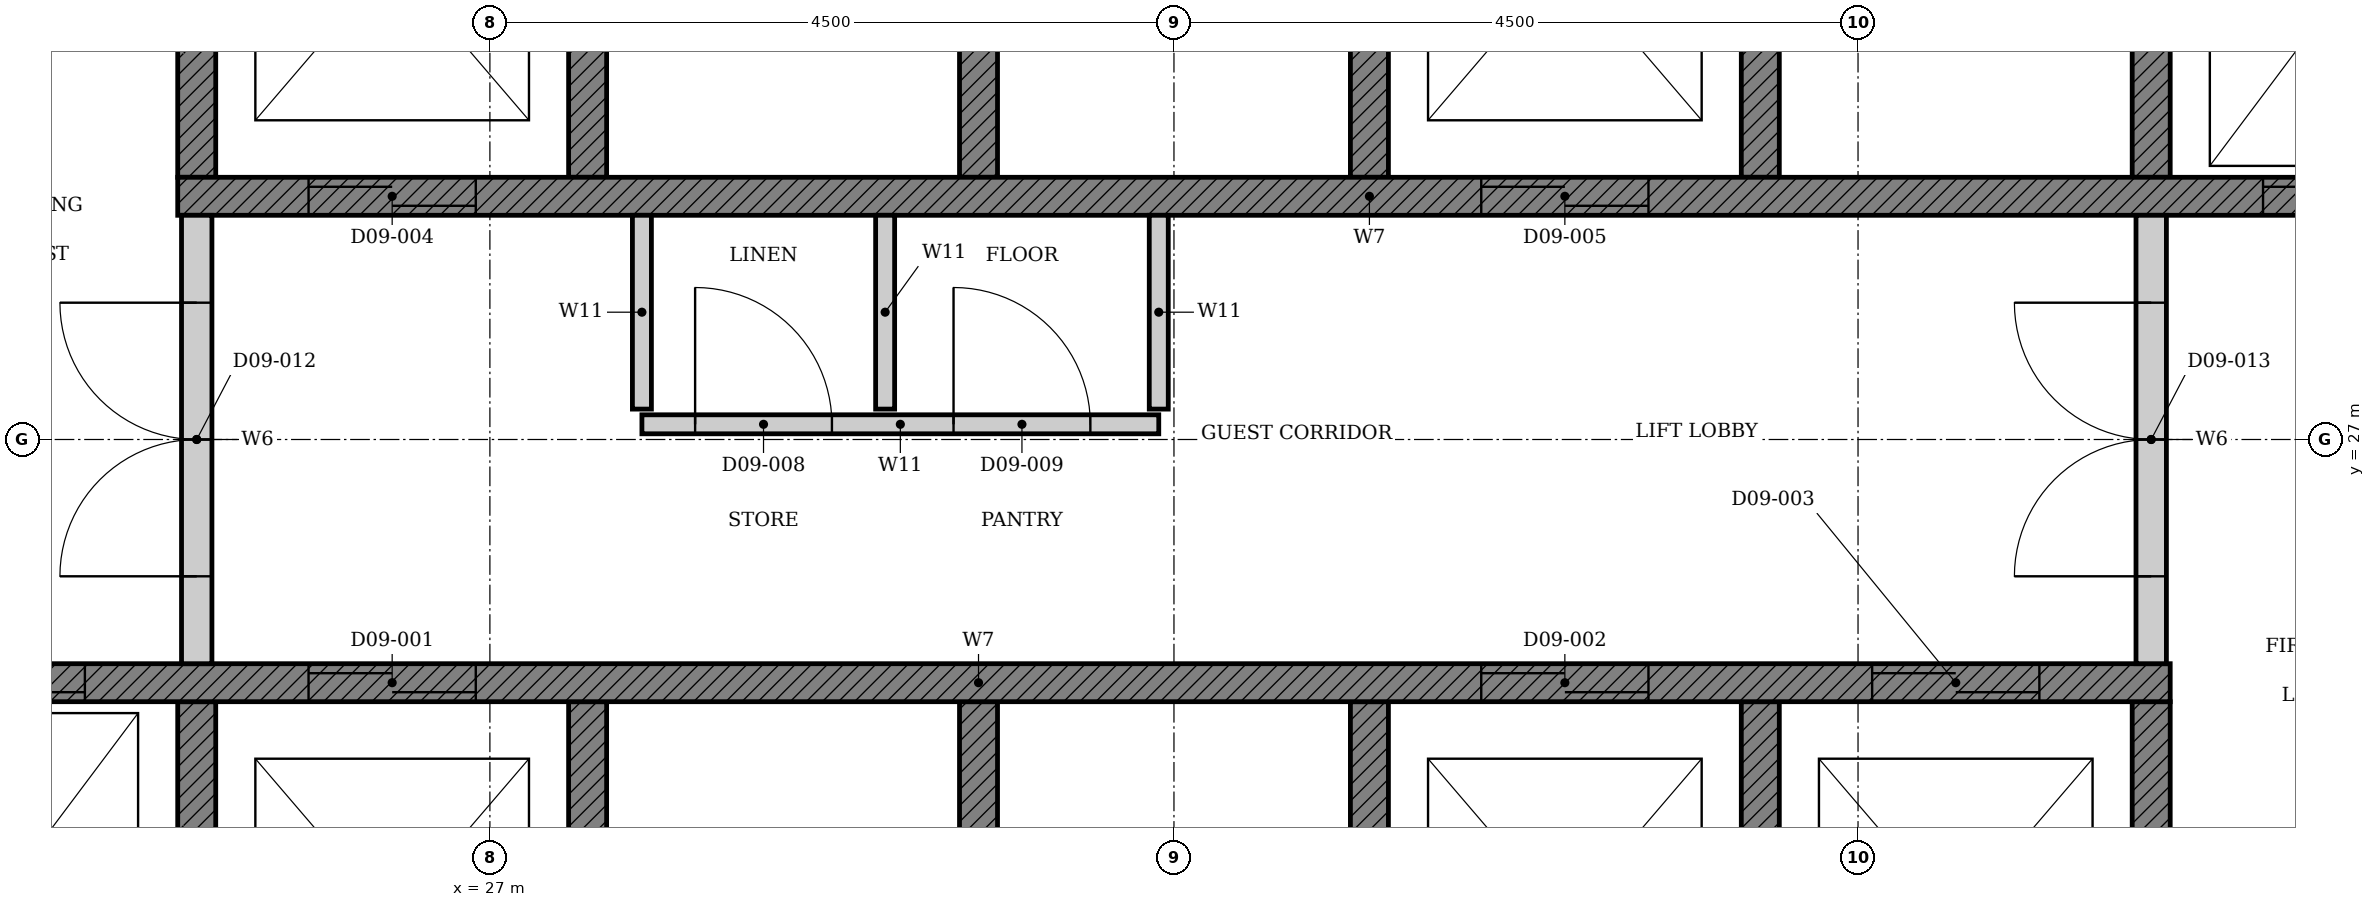
"""IFC4 building model, lengths in metres.
Left out: names, types, materials, properties, quantities, classifications, styles, units other than length and angle.
Written with IfcOpenShell. Run it as: python <this file> out.ifc"""

import sys

from ifc_helpers import new_model, si_unit, direction, frame, frame_2d, origin, place, context, subcontext, project, spatial, polyline, rectangle, outline, extrude, element, fill, save


model = new_model("IFC4")
c1 = context("Model", 3, precision=1e-05, world=origin(), true_north=direction((0.0, 1.0)))
c2 = subcontext(c1, "Body", "Model", "MODEL_VIEW")
j1 = project(units=[si_unit("LENGTHUNIT", "METRE"), si_unit("PLANEANGLEUNIT", "RADIAN")], contexts=[c1])
p1 = place(None, origin())
s1 = spatial("IfcSite", under=j1, at=p1, CompositionType="ELEMENT")
p2 = place(p1, origin())
s2 = spatial("IfcBuilding", under=s1, at=p2, CompositionType="ELEMENT")
p3 = place(p2, frame((0.0, 0.0, 44.4)))
s3 = spatial("IfcBuildingStorey", under=s2, at=p3, CompositionType="ELEMENT", Elevation=44.4)
p4 = place(p3, origin())
e1 = element("IfcWall", 1, at=p4, inside=s3, PredefinedType="SHEAR", context=c2, shape_type="SweptSolid", body=[
    extrude(outline(polyline([(22.375, 22.35), (38.053, 22.35), (38.053, 25.275), (37.803, 25.275), (37.803, 22.65), (35.482, 22.65), (35.482, 25.275), (35.232, 25.275), (35.232, 22.65), (32.911, 22.65), (32.911, 25.275), (32.661, 25.275), (32.661, 22.65), (30.339, 22.65), (30.339, 25.275), (30.089, 25.275), (30.089, 22.65), (27.768, 22.65), (27.768, 25.275), (27.518, 25.275), (27.518, 22.65), (25.197, 22.65), (25.197, 25.275), (24.947, 25.275), (24.947, 22.65), (22.625, 22.65), (22.625, 25.275), (22.375, 25.275), (22.375, 22.35)])), origin(), (0.0, 0.0, 1.0), 3.2),
])
p5 = place(p3, origin())
e2 = element("IfcWall", 2, at=p5, inside=s3, PredefinedType="SHEAR", context=c2, shape_type="SweptSolid", body=[
    extrude(outline(polyline([(24.947, 28.725), (25.197, 28.725), (25.197, 31.35), (27.518, 31.35), (27.518, 28.725), (27.768, 28.725), (27.768, 31.35), (30.089, 31.35), (30.089, 28.725), (30.339, 28.725), (30.339, 31.35), (32.661, 31.35), (32.661, 28.725), (32.911, 28.725), (32.911, 31.35), (35.232, 31.35), (35.232, 28.725), (35.482, 28.725), (35.482, 31.35), (37.803, 31.35), (37.803, 28.725), (38.053, 28.725), (38.053, 31.35), (40.375, 31.35), (40.375, 28.725), (40.625, 28.725), (40.625, 31.65), (24.947, 31.65), (24.947, 28.725)])), origin(), (0.0, 0.0, 1.0), 3.2),
])
p6 = place(p3, frame((22.375, 25.4, 0.0), z_axis=(0.0, 0.0, 1.0), x_axis=(1.0, 0.0, 0.0)))
e3 = element("IfcWall", 3, at=p6, inside=s3, PredefinedType="SHEAR", context=c2, shape_type="SweptSolid", body=[
    extrude(rectangle(XDim=15.678, YDim=0.25, at=frame_2d((7.839, 0.0))), origin(), (0.0, 0.0, 1.0), 3.2),
])
p7 = place(p6, frame((3.432, 0.0, 0.0)))
e4 = element("IfcOpeningElement", 4, at=p7, cuts=e3, PredefinedType="OPENING", context=c2, shape_type="SweptSolid", body=[
    extrude(rectangle(XDim=1.1, YDim=2.1, at=frame_2d((0.55, 1.05))), frame((0.0, 0.135, 0.0), z_axis=(0.0, -1.0, 0.0), x_axis=(1.0, 0.0, 0.0)), (0.0, 0.0, 1.0), 0.27),
])
p8 = place(p6, frame((11.146, 0.0, 0.0)))
e5 = element("IfcOpeningElement", 5, at=p8, cuts=e3, PredefinedType="OPENING", context=c2, shape_type="SweptSolid", body=[
    extrude(rectangle(XDim=1.1, YDim=2.1, at=frame_2d((0.55, 1.05))), frame((0.0, 0.135, 0.0), z_axis=(0.0, -1.0, 0.0), x_axis=(1.0, 0.0, 0.0)), (0.0, 0.0, 1.0), 0.27),
])
p9 = place(p6, frame((13.718, 0.0, 0.0)))
e6 = element("IfcOpeningElement", 6, at=p9, cuts=e3, PredefinedType="OPENING", context=c2, shape_type="SweptSolid", body=[
    extrude(rectangle(XDim=1.1, YDim=2.1, at=frame_2d((0.55, 1.05))), frame((0.0, 0.135, 0.0), z_axis=(0.0, -1.0, 0.0), x_axis=(1.0, 0.0, 0.0)), (0.0, 0.0, 1.0), 0.27),
])
p10 = place(p6, frame((0.861, 0.0, 0.0)))
e7 = element("IfcOpeningElement", 7, at=p10, cuts=e3, PredefinedType="OPENING", context=c2, shape_type="SweptSolid", body=[
    extrude(rectangle(XDim=1.1, YDim=2.1, at=frame_2d((0.55, 1.05))), frame((0.0, 0.135, 0.0), z_axis=(0.0, -1.0, 0.0), x_axis=(1.0, 0.0, 0.0)), (0.0, 0.0, 1.0), 0.27),
])
p11 = place(p3, frame((24.947, 28.6, 0.0), z_axis=(0.0, 0.0, 1.0), x_axis=(1.0, 0.0, 0.0)))
e8 = element("IfcWall", 8, at=p11, inside=s3, PredefinedType="SHEAR", context=c2, shape_type="SweptSolid", body=[
    extrude(rectangle(XDim=15.678, YDim=0.25, at=frame_2d((7.839, 0.0))), origin(), (0.0, 0.0, 1.0), 3.2),
])
p12 = place(p11, frame((0.861, 0.0, 0.0)))
e9 = element("IfcOpeningElement", 9, at=p12, cuts=e8, PredefinedType="OPENING", context=c2, shape_type="SweptSolid", body=[
    extrude(rectangle(XDim=1.1, YDim=2.1, at=frame_2d((0.55, 1.05))), frame((0.0, 0.135, 0.0), z_axis=(0.0, -1.0, 0.0), x_axis=(1.0, 0.0, 0.0)), (0.0, 0.0, 1.0), 0.27),
])
p13 = place(p11, frame((8.575, 0.0, 0.0)))
e10 = element("IfcOpeningElement", 10, at=p13, cuts=e8, PredefinedType="OPENING", context=c2, shape_type="SweptSolid", body=[
    extrude(rectangle(XDim=1.1, YDim=2.1, at=frame_2d((0.55, 1.05))), frame((0.0, 0.135, 0.0), z_axis=(0.0, -1.0, 0.0), x_axis=(1.0, 0.0, 0.0)), (0.0, 0.0, 1.0), 0.27),
])
p14 = place(p11, frame((13.718, 0.0, 0.0)))
e11 = element("IfcOpeningElement", 11, at=p14, cuts=e8, PredefinedType="OPENING", context=c2, shape_type="SweptSolid", body=[
    extrude(rectangle(XDim=1.1, YDim=2.1, at=frame_2d((0.55, 1.05))), frame((0.0, 0.135, 0.0), z_axis=(0.0, -1.0, 0.0), x_axis=(1.0, 0.0, 0.0)), (0.0, 0.0, 1.0), 0.27),
])
p15 = place(p3, frame((28.0, 27.1, 0.0), z_axis=(0.0, 0.0, 1.0), x_axis=(1.0, 0.0, 0.0)))
e12 = element("IfcWall", 12, at=p15, inside=s3, PredefinedType="PARTITIONING", context=c2, shape_type="SweptSolid", body=[
    extrude(rectangle(XDim=3.4, YDim=0.125, at=frame_2d((1.7, 0.0))), origin(), (0.0, 0.0, 1.0), 3.2),
])
p16 = place(p15, frame((0.35, 0.0, 0.0)))
e13 = element("IfcOpeningElement", 13, at=p16, cuts=e12, PredefinedType="OPENING", context=c2, shape_type="SweptSolid", body=[
    extrude(rectangle(XDim=0.9, YDim=2.1, at=frame_2d((0.45, 1.05))), frame((0.0, 0.073, 0.0), z_axis=(0.0, -1.0, 0.0), x_axis=(1.0, 0.0, 0.0)), (0.0, 0.0, 1.0), 0.145),
])
p17 = place(p15, frame((2.05, 0.0, 0.0)))
e14 = element("IfcOpeningElement", 14, at=p17, cuts=e12, PredefinedType="OPENING", context=c2, shape_type="SweptSolid", body=[
    extrude(rectangle(XDim=0.9, YDim=2.1, at=frame_2d((0.45, 1.05))), frame((0.0, 0.073, 0.0), z_axis=(0.0, -1.0, 0.0), x_axis=(1.0, 0.0, 0.0)), (0.0, 0.0, 1.0), 0.145),
])
for number, where, z_axis, x_axis in (
    (15, (28.0, 28.475, 0.0), (0.0, 0.0, 1.0), (0.0, -1.0, 0.0)),
    (16, (29.6, 28.475, 0.0), (0.0, 0.0, 1.0), (0.0, -1.0, 0.0)),
    (17, (31.4, 28.475, 0.0), (0.0, 0.0, 1.0), (0.0, -1.0, 0.0)),
):
    element("IfcWall", number, at=place(p3, frame(where, z_axis=z_axis, x_axis=x_axis)), inside=s3, PredefinedType="PARTITIONING", context=c2, shape_type="SweptSolid", body=[
        extrude(rectangle(XDim=1.275, YDim=0.125, at=frame_2d((0.638, 0.0))), origin(), (0.0, 0.0, 1.0), 3.2),
    ])
p18 = place(p3, frame((25.072, 25.525, 0.0), z_axis=(0.0, 0.0, 1.0), x_axis=(0.0, 1.0, 0.0)))
e18 = element("IfcWall", 18, at=p18, inside=s3, PredefinedType="PARTITIONING", context=c2, shape_type="SweptSolid", body=[
    extrude(rectangle(XDim=2.95, YDim=0.2, at=frame_2d((1.475, 0.0))), origin(), (0.0, 0.0, 1.0), 3.2),
])
p19 = place(p18, frame((0.575, 0.0, 0.0)))
e19 = element("IfcOpeningElement", 19, at=p19, cuts=e18, PredefinedType="OPENING", context=c2, shape_type="SweptSolid", body=[
    extrude(rectangle(XDim=1.8, YDim=2.1, at=frame_2d((0.9, 1.05))), frame((0.0, 0.11, 0.0), z_axis=(0.0, -1.0, 0.0), x_axis=(1.0, 0.0, 0.0)), (0.0, 0.0, 1.0), 0.22),
])
p20 = place(p3, frame((37.928, 25.525, 0.0), z_axis=(0.0, 0.0, 1.0), x_axis=(0.0, 1.0, 0.0)))
e20 = element("IfcWall", 20, at=p20, inside=s3, PredefinedType="PARTITIONING", context=c2, shape_type="SweptSolid", body=[
    extrude(rectangle(XDim=2.95, YDim=0.2, at=frame_2d((1.475, 0.0))), origin(), (0.0, 0.0, 1.0), 3.2),
])
p21 = place(p20, frame((0.575, 0.0, 0.0)))
e21 = element("IfcOpeningElement", 21, at=p21, cuts=e20, PredefinedType="OPENING", context=c2, shape_type="SweptSolid", body=[
    extrude(rectangle(XDim=1.8, YDim=2.1, at=frame_2d((0.9, 1.05))), frame((0.0, 0.11, 0.0), z_axis=(0.0, -1.0, 0.0), x_axis=(1.0, 0.0, 0.0)), (0.0, 0.0, 1.0), 0.22),
])
p22 = place(p7, origin())
e22 = element("IfcDoor", 22, at=p22, inside=s3, OperationType="DOUBLE_DOOR_SLIDING", PredefinedType="DOOR", context=c2, shape_type="SweptSolid", body=[
    extrude(rectangle(XDim=1.1, YDim=2.1, at=frame_2d((0.55, 1.05))), frame((0.0, 0.025, 0.0), z_axis=(0.0, -1.0, 0.0), x_axis=(1.0, 0.0, 0.0)), (0.0, 0.0, 1.0), 0.05),
])
fill(e4, e22)
p23 = place(p8, origin())
e23 = element("IfcDoor", 23, at=p23, inside=s3, OperationType="DOUBLE_DOOR_SLIDING", PredefinedType="DOOR", context=c2, shape_type="SweptSolid", body=[
    extrude(rectangle(XDim=1.1, YDim=2.1, at=frame_2d((0.55, 1.05))), frame((0.0, 0.025, 0.0), z_axis=(0.0, -1.0, 0.0), x_axis=(1.0, 0.0, 0.0)), (0.0, 0.0, 1.0), 0.05),
])
fill(e5, e23)
p24 = place(p9, origin())
e24 = element("IfcDoor", 24, at=p24, inside=s3, OperationType="DOUBLE_DOOR_SLIDING", PredefinedType="DOOR", context=c2, shape_type="SweptSolid", body=[
    extrude(rectangle(XDim=1.1, YDim=2.1, at=frame_2d((0.55, 1.05))), frame((0.0, 0.025, 0.0), z_axis=(0.0, -1.0, 0.0), x_axis=(1.0, 0.0, 0.0)), (0.0, 0.0, 1.0), 0.05),
])
fill(e6, e24)
p25 = place(p12, origin())
e25 = element("IfcDoor", 25, at=p25, inside=s3, OperationType="DOUBLE_DOOR_SLIDING", PredefinedType="DOOR", context=c2, shape_type="SweptSolid", body=[
    extrude(rectangle(XDim=1.1, YDim=2.1, at=frame_2d((0.55, 1.05))), frame((0.0, 0.025, 0.0), z_axis=(0.0, -1.0, 0.0), x_axis=(1.0, 0.0, 0.0)), (0.0, 0.0, 1.0), 0.05),
])
fill(e9, e25)
p26 = place(p13, origin())
e26 = element("IfcDoor", 26, at=p26, inside=s3, OperationType="DOUBLE_DOOR_SLIDING", PredefinedType="DOOR", context=c2, shape_type="SweptSolid", body=[
    extrude(rectangle(XDim=1.1, YDim=2.1, at=frame_2d((0.55, 1.05))), frame((0.0, 0.025, 0.0), z_axis=(0.0, -1.0, 0.0), x_axis=(1.0, 0.0, 0.0)), (0.0, 0.0, 1.0), 0.05),
])
fill(e10, e26)
p27 = place(p10, origin())
e27 = element("IfcDoor", 27, at=p27, inside=s3, OperationType="DOUBLE_DOOR_SLIDING", PredefinedType="DOOR", context=c2, shape_type="SweptSolid", body=[
    extrude(rectangle(XDim=1.1, YDim=2.1, at=frame_2d((0.55, 1.05))), frame((0.0, 0.025, 0.0), z_axis=(0.0, -1.0, 0.0), x_axis=(1.0, 0.0, 0.0)), (0.0, 0.0, 1.0), 0.05),
])
fill(e7, e27)
p28 = place(p14, origin())
e28 = element("IfcDoor", 28, at=p28, inside=s3, OperationType="DOUBLE_DOOR_SLIDING", PredefinedType="DOOR", context=c2, shape_type="SweptSolid", body=[
    extrude(rectangle(XDim=1.1, YDim=2.1, at=frame_2d((0.55, 1.05))), frame((0.0, 0.025, 0.0), z_axis=(0.0, -1.0, 0.0), x_axis=(1.0, 0.0, 0.0)), (0.0, 0.0, 1.0), 0.05),
])
fill(e11, e28)
p29 = place(p16, origin())
e29 = element("IfcDoor", 29, at=p29, inside=s3, OperationType="SINGLE_SWING_LEFT", PredefinedType="DOOR", context=c2, shape_type="SweptSolid", body=[
    extrude(rectangle(XDim=0.9, YDim=2.1, at=frame_2d((0.45, 1.05))), frame((0.0, 0.025, 0.0), z_axis=(0.0, -1.0, 0.0), x_axis=(1.0, 0.0, 0.0)), (0.0, 0.0, 1.0), 0.05),
])
fill(e13, e29)
p30 = place(p17, origin())
e30 = element("IfcDoor", 30, at=p30, inside=s3, OperationType="SINGLE_SWING_LEFT", PredefinedType="DOOR", context=c2, shape_type="SweptSolid", body=[
    extrude(rectangle(XDim=0.9, YDim=2.1, at=frame_2d((0.45, 1.05))), frame((0.0, 0.025, 0.0), z_axis=(0.0, -1.0, 0.0), x_axis=(1.0, 0.0, 0.0)), (0.0, 0.0, 1.0), 0.05),
])
fill(e14, e30)
p31 = place(p19, origin())
e31 = element("IfcDoor", 31, at=p31, inside=s3, OperationType="DOUBLE_DOOR_SINGLE_SWING", PredefinedType="DOOR", context=c2, shape_type="SweptSolid", body=[
    extrude(rectangle(XDim=1.8, YDim=2.1, at=frame_2d((0.9, 1.05))), frame((0.0, 0.025, 0.0), z_axis=(0.0, -1.0, 0.0), x_axis=(1.0, 0.0, 0.0)), (0.0, 0.0, 1.0), 0.05),
])
fill(e19, e31)
p32 = place(p21, origin())
e32 = element("IfcDoor", 32, at=p32, inside=s3, OperationType="DOUBLE_DOOR_SINGLE_SWING", PredefinedType="DOOR", context=c2, shape_type="SweptSolid", body=[
    extrude(rectangle(XDim=1.8, YDim=2.1, at=frame_2d((0.9, 1.05))), frame((0.0, 0.025, 0.0), z_axis=(0.0, -1.0, 0.0), x_axis=(1.0, 0.0, 0.0)), (0.0, 0.0, 1.0), 0.05),
])
fill(e21, e32)
save(model, sys.argv[1])
